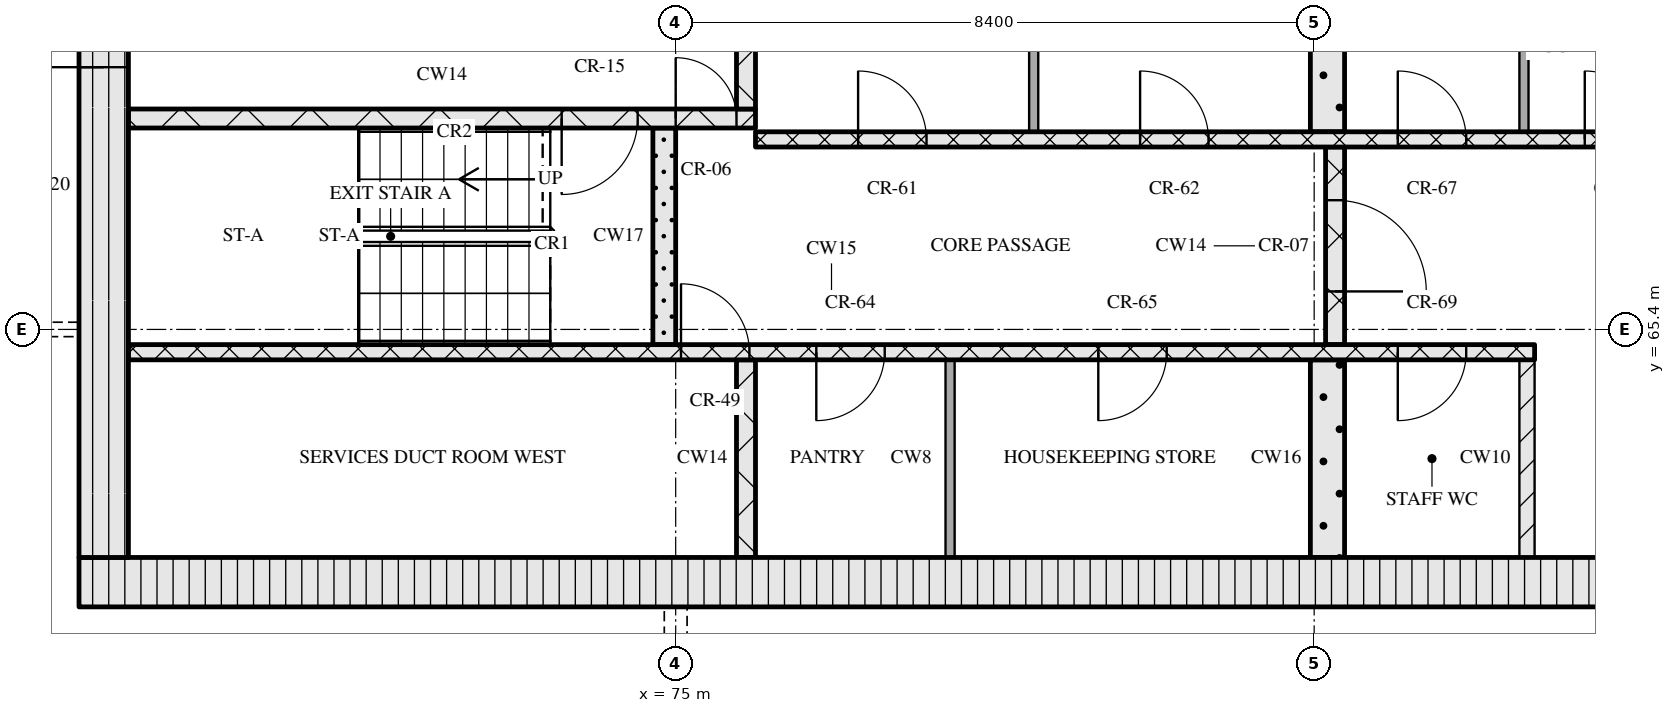
"""IFC4 building model, lengths in metres.
Left out: names, types, materials, properties, quantities, classifications, styles, units other than length and angle.
Written with IfcOpenShell. Run it as: python <this file> out.ifc"""

import sys

from ifc_helpers import new_model, si_unit, direction, frame, frame_2d, origin, place, context, subcontext, project, spatial, rectangle, extrude, element, fill, save


model = new_model("IFC4")
c1 = context("Model", 3, precision=1e-05, world=origin(), true_north=direction((0.0, 1.0)))
c2 = subcontext(c1, "Body", "Model", "MODEL_VIEW")
j1 = project(units=[si_unit("LENGTHUNIT", "METRE"), si_unit("PLANEANGLEUNIT", "RADIAN")], contexts=[c1])
p1 = place(None, origin())
s1 = spatial("IfcSite", under=j1, at=p1, CompositionType="ELEMENT")
p2 = place(p1, origin())
s2 = spatial("IfcBuilding", under=s1, at=p2, CompositionType="ELEMENT")
p3 = place(p2, frame((0.0, 0.0, 230.7)))
s3 = spatial("IfcBuildingStorey", under=s2, at=p3, CompositionType="ELEMENT", Elevation=230.7)
p4 = place(p3, frame((67.15, 62.075, 0.0), z_axis=(0.0, 0.0, 1.0), x_axis=(1.0, 0.0, 0.0)))
e1 = element("IfcWall", 1, at=p4, inside=s3, PredefinedType="SOLIDWALL", context=c2, shape_type="SweptSolid", body=[
    extrude(rectangle(XDim=40.9, YDim=0.65, at=frame_2d((20.45, 0.0))), origin(), (0.0, 0.0, 1.0), 3.32),
])
p5 = place(p4, frame((20.8, 0.0, 0.0)))
e2 = element("IfcOpeningElement", 2, at=p5, cuts=e1, PredefinedType="OPENING", context=c2, shape_type="SweptSolid", body=[
    extrude(rectangle(XDim=1.8, YDim=2.1, at=frame_2d((0.9, 1.05))), frame((0.0, 0.335, 0.0), z_axis=(0.0, -1.0, 0.0), x_axis=(1.0, 0.0, 0.0)), (0.0, 0.0, 1.0), 0.67),
])
p6 = place(p3, frame((67.475, 62.4, 0.0), z_axis=(0.0, 0.0, 1.0), x_axis=(0.0, 1.0, 0.0)))
e3 = element("IfcWall", 3, at=p6, inside=s3, PredefinedType="SOLIDWALL", context=c2, shape_type="SweptSolid", body=[
    extrude(rectangle(XDim=12.0, YDim=0.65, at=frame_2d((6.0, 0.0))), origin(), (0.0, 0.0, 1.0), 3.32),
])
p7 = place(p6, frame((6.45, 0.0, 0.0)))
e4 = element("IfcOpeningElement", 4, at=p7, cuts=e3, PredefinedType="OPENING", context=c2, shape_type="SweptSolid", body=[
    extrude(rectangle(XDim=1.2, YDim=2.1, at=frame_2d((0.6, 1.05))), frame((0.0, 0.335, 0.0), z_axis=(0.0, -1.0, 0.0), x_axis=(1.0, 0.0, 0.0)), (0.0, 0.0, 1.0), 0.67),
])
p8 = place(p3, frame((75.925, 62.4, 0.0), z_axis=(0.0, 0.0, 1.0), x_axis=(0.0, 1.0, 0.0)))
e5 = element("IfcWall", 5, at=p8, inside=s3, PredefinedType="SOLIDWALL", context=c2, shape_type="SweptSolid", body=[
    extrude(rectangle(XDim=2.6, YDim=0.25, at=frame_2d((1.3, 0.0))), origin(), (0.0, 0.0, 1.0), 3.32),
])
p9 = place(p3, frame((78.61, 62.4, 0.0), z_axis=(0.0, 0.0, 1.0), x_axis=(0.0, 1.0, 0.0)))
e6 = element("IfcWall", 6, at=p9, inside=s3, PredefinedType="PARTITIONING", context=c2, shape_type="SweptSolid", body=[
    extrude(rectangle(XDim=2.6, YDim=0.12, at=frame_2d((1.3, 0.0))), origin(), (0.0, 0.0, 1.0), 3.32),
])
p10 = place(p3, frame((83.575, 62.4, 0.0), z_axis=(0.0, 0.0, 1.0), x_axis=(0.0, 1.0, 0.0)))
e7 = element("IfcWall", 7, at=p10, inside=s3, PredefinedType="SOLIDWALL", context=c2, shape_type="SweptSolid", body=[
    extrude(rectangle(XDim=2.6, YDim=0.45, at=frame_2d((1.3, 0.0))), origin(), (0.0, 0.0, 1.0), 3.32),
])
p11 = place(p3, frame((86.2, 62.4, 0.0), z_axis=(0.0, 0.0, 1.0), x_axis=(0.0, 1.0, 0.0)))
e8 = element("IfcWall", 8, at=p11, inside=s3, PredefinedType="PARTITIONING", context=c2, shape_type="SweptSolid", body=[
    extrude(rectangle(XDim=2.6, YDim=0.2, at=frame_2d((1.3, 0.0))), origin(), (0.0, 0.0, 1.0), 3.32),
])
p12 = place(p3, frame((67.8, 65.1, 0.0), z_axis=(0.0, 0.0, 1.0), x_axis=(1.0, 0.0, 0.0)))
e9 = element("IfcWall", 9, at=p12, inside=s3, PredefinedType="SOLIDWALL", context=c2, shape_type="SweptSolid", body=[
    extrude(rectangle(XDim=18.5, YDim=0.2, at=frame_2d((9.25, 0.0))), origin(), (0.0, 0.0, 1.0), 3.32),
])
p13 = place(p12, frame((7.27, 0.0, 0.0)))
e10 = element("IfcOpeningElement", 10, at=p13, cuts=e9, PredefinedType="OPENING", context=c2, shape_type="SweptSolid", body=[
    extrude(rectangle(XDim=0.9, YDim=2.1, at=frame_2d((0.45, 1.05))), frame((0.0, 0.11, 0.0), z_axis=(0.0, -1.0, 0.0), x_axis=(1.0, 0.0, 0.0)), (0.0, 0.0, 1.0), 0.22),
])
p14 = place(p12, frame((9.05, 0.0, 0.0)))
e11 = element("IfcOpeningElement", 11, at=p14, cuts=e9, PredefinedType="OPENING", context=c2, shape_type="SweptSolid", body=[
    extrude(rectangle(XDim=0.9, YDim=2.1, at=frame_2d((0.45, 1.05))), frame((0.0, 0.11, 0.0), z_axis=(0.0, -1.0, 0.0), x_axis=(1.0, 0.0, 0.0)), (0.0, 0.0, 1.0), 0.22),
])
p15 = place(p12, frame((12.76, 0.0, 0.0)))
e12 = element("IfcOpeningElement", 12, at=p15, cuts=e9, PredefinedType="OPENING", context=c2, shape_type="SweptSolid", body=[
    extrude(rectangle(XDim=0.9, YDim=2.1, at=frame_2d((0.45, 1.05))), frame((0.0, 0.11, 0.0), z_axis=(0.0, -1.0, 0.0), x_axis=(1.0, 0.0, 0.0)), (0.0, 0.0, 1.0), 0.22),
])
p16 = place(p12, frame((16.7, 0.0, 0.0)))
e13 = element("IfcOpeningElement", 13, at=p16, cuts=e9, PredefinedType="OPENING", context=c2, shape_type="SweptSolid", body=[
    extrude(rectangle(XDim=0.9, YDim=2.1, at=frame_2d((0.45, 1.05))), frame((0.0, 0.11, 0.0), z_axis=(0.0, -1.0, 0.0), x_axis=(1.0, 0.0, 0.0)), (0.0, 0.0, 1.0), 0.22),
])
p17 = place(p3, frame((74.85, 65.2, 0.0), z_axis=(0.0, 0.0, 1.0), x_axis=(0.0, 1.0, 0.0)))
e14 = element("IfcWall", 14, at=p17, inside=s3, PredefinedType="SOLIDWALL", context=c2, shape_type="SweptSolid", body=[
    extrude(rectangle(XDim=2.85, YDim=0.3, at=frame_2d((1.425, 0.0))), origin(), (0.0, 0.0, 1.0), 3.32),
])
p18 = place(p3, frame((83.675, 65.2, 0.0), z_axis=(0.0, 0.0, 1.0), x_axis=(0.0, 1.0, 0.0)))
e15 = element("IfcWall", 15, at=p18, inside=s3, PredefinedType="SOLIDWALL", context=c2, shape_type="SweptSolid", body=[
    extrude(rectangle(XDim=2.6, YDim=0.25, at=frame_2d((1.3, 0.0))), origin(), (0.0, 0.0, 1.0), 3.32),
])
p19 = place(p18, frame((0.7, 0.0, 0.0)))
e16 = element("IfcOpeningElement", 16, at=p19, cuts=e15, PredefinedType="OPENING", context=c2, shape_type="SweptSolid", body=[
    extrude(rectangle(XDim=1.2, YDim=2.1, at=frame_2d((0.6, 1.05))), frame((0.0, 0.135, 0.0), z_axis=(0.0, -1.0, 0.0), x_axis=(1.0, 0.0, 0.0)), (0.0, 0.0, 1.0), 0.27),
])
p20 = place(p3, frame((76.05, 67.9, 0.0), z_axis=(0.0, 0.0, 1.0), x_axis=(1.0, 0.0, 0.0)))
e17 = element("IfcWall", 17, at=p20, inside=s3, PredefinedType="SOLIDWALL", context=c2, shape_type="SweptSolid", body=[
    extrude(rectangle(XDim=23.1, YDim=0.2, at=frame_2d((11.55, 0.0))), origin(), (0.0, 0.0, 1.0), 3.32),
])
p21 = place(p20, frame((1.35, 0.0, 0.0)))
e18 = element("IfcOpeningElement", 18, at=p21, cuts=e17, PredefinedType="OPENING", context=c2, shape_type="SweptSolid", body=[
    extrude(rectangle(XDim=0.9, YDim=2.1, at=frame_2d((0.45, 1.05))), frame((0.0, 0.11, 0.0), z_axis=(0.0, -1.0, 0.0), x_axis=(1.0, 0.0, 0.0)), (0.0, 0.0, 1.0), 0.22),
])
p22 = place(p20, frame((5.06, 0.0, 0.0)))
e19 = element("IfcOpeningElement", 19, at=p22, cuts=e17, PredefinedType="OPENING", context=c2, shape_type="SweptSolid", body=[
    extrude(rectangle(XDim=0.9, YDim=2.1, at=frame_2d((0.45, 1.05))), frame((0.0, 0.11, 0.0), z_axis=(0.0, -1.0, 0.0), x_axis=(1.0, 0.0, 0.0)), (0.0, 0.0, 1.0), 0.22),
])
p23 = place(p20, frame((8.45, 0.0, 0.0)))
e20 = element("IfcOpeningElement", 20, at=p23, cuts=e17, PredefinedType="OPENING", context=c2, shape_type="SweptSolid", body=[
    extrude(rectangle(XDim=0.9, YDim=2.1, at=frame_2d((0.45, 1.05))), frame((0.0, 0.11, 0.0), z_axis=(0.0, -1.0, 0.0), x_axis=(1.0, 0.0, 0.0)), (0.0, 0.0, 1.0), 0.22),
])
p24 = place(p20, frame((10.91, 0.0, 0.0)))
e21 = element("IfcOpeningElement", 21, at=p24, cuts=e17, PredefinedType="OPENING", context=c2, shape_type="SweptSolid", body=[
    extrude(rectangle(XDim=0.9, YDim=2.1, at=frame_2d((0.45, 1.05))), frame((0.0, 0.11, 0.0), z_axis=(0.0, -1.0, 0.0), x_axis=(1.0, 0.0, 0.0)), (0.0, 0.0, 1.0), 0.22),
])
p25 = place(p20, frame((13.55, 0.0, 0.0)))
e22 = element("IfcOpeningElement", 22, at=p25, cuts=e17, PredefinedType="OPENING", context=c2, shape_type="SweptSolid", body=[
    extrude(rectangle(XDim=1.0, YDim=2.1, at=frame_2d((0.5, 1.05))), frame((0.0, 0.11, 0.0), z_axis=(0.0, -1.0, 0.0), x_axis=(1.0, 0.0, 0.0)), (0.0, 0.0, 1.0), 0.22),
])
p26 = place(p20, frame((16.2, 0.0, 0.0)))
e23 = element("IfcOpeningElement", 23, at=p26, cuts=e17, PredefinedType="OPENING", context=c2, shape_type="SweptSolid", body=[
    extrude(rectangle(XDim=1.1, YDim=2.1, at=frame_2d((0.55, 1.05))), frame((0.0, 0.11, 0.0), z_axis=(0.0, -1.0, 0.0), x_axis=(1.0, 0.0, 0.0)), (0.0, 0.0, 1.0), 0.22),
])
p27 = place(p20, frame((18.7, 0.0, 0.0)))
e24 = element("IfcOpeningElement", 24, at=p27, cuts=e17, PredefinedType="OPENING", context=c2, shape_type="SweptSolid", body=[
    extrude(rectangle(XDim=1.1, YDim=2.1, at=frame_2d((0.55, 1.05))), frame((0.0, 0.11, 0.0), z_axis=(0.0, -1.0, 0.0), x_axis=(1.0, 0.0, 0.0)), (0.0, 0.0, 1.0), 0.22),
])
p28 = place(p20, frame((21.2, 0.0, 0.0)))
e25 = element("IfcOpeningElement", 25, at=p28, cuts=e17, PredefinedType="OPENING", context=c2, shape_type="SweptSolid", body=[
    extrude(rectangle(XDim=1.1, YDim=2.1, at=frame_2d((0.55, 1.05))), frame((0.0, 0.11, 0.0), z_axis=(0.0, -1.0, 0.0), x_axis=(1.0, 0.0, 0.0)), (0.0, 0.0, 1.0), 0.22),
])
p29 = place(p3, frame((79.71, 68.0, 0.0), z_axis=(0.0, 0.0, 1.0), x_axis=(0.0, 1.0, 0.0)))
e26 = element("IfcWall", 26, at=p29, inside=s3, PredefinedType="PARTITIONING", context=c2, shape_type="SweptSolid", body=[
    extrude(rectangle(XDim=2.6, YDim=0.12, at=frame_2d((1.3, 0.0))), origin(), (0.0, 0.0, 1.0), 3.32),
])
p30 = place(p3, frame((83.575, 68.0, 0.0), z_axis=(0.0, 0.0, 1.0), x_axis=(0.0, 1.0, 0.0)))
e27 = element("IfcWall", 27, at=p30, inside=s3, PredefinedType="SOLIDWALL", context=c2, shape_type="SweptSolid", body=[
    extrude(rectangle(XDim=2.6, YDim=0.45, at=frame_2d((1.3, 0.0))), origin(), (0.0, 0.0, 1.0), 3.32),
])
p31 = place(p3, frame((86.16, 68.0, 0.0), z_axis=(0.0, 0.0, 1.0), x_axis=(0.0, 1.0, 0.0)))
e28 = element("IfcWall", 28, at=p31, inside=s3, PredefinedType="PARTITIONING", context=c2, shape_type="SweptSolid", body=[
    extrude(rectangle(XDim=2.6, YDim=0.12, at=frame_2d((1.3, 0.0))), origin(), (0.0, 0.0, 1.0), 3.32),
])
p32 = place(p3, frame((67.8, 68.175, 0.0), z_axis=(0.0, 0.0, 1.0), x_axis=(1.0, 0.0, 0.0)))
e29 = element("IfcWall", 29, at=p32, inside=s3, PredefinedType="SOLIDWALL", context=c2, shape_type="SweptSolid", body=[
    extrude(rectangle(XDim=8.25, YDim=0.25, at=frame_2d((4.125, 0.0))), origin(), (0.0, 0.0, 1.0), 3.32),
])
p33 = place(p32, frame((5.7, 0.0, 0.0)))
e30 = element("IfcOpeningElement", 30, at=p33, cuts=e29, PredefinedType="OPENING", context=c2, shape_type="SweptSolid", body=[
    extrude(rectangle(XDim=1.0, YDim=2.1, at=frame_2d((0.5, 1.05))), frame((0.0, 0.135, 0.0), z_axis=(0.0, -1.0, 0.0), x_axis=(1.0, 0.0, 0.0)), (0.0, 0.0, 1.0), 0.27),
])
p34 = place(p32, frame((7.2, 0.0, 0.0)))
e31 = element("IfcOpeningElement", 31, at=p34, cuts=e29, PredefinedType="OPENING", context=c2, shape_type="SweptSolid", body=[
    extrude(rectangle(XDim=0.8, YDim=2.1, at=frame_2d((0.4, 1.05))), frame((0.0, 0.135, 0.0), z_axis=(0.0, -1.0, 0.0), x_axis=(1.0, 0.0, 0.0)), (0.0, 0.0, 1.0), 0.27),
])
p35 = place(p3, frame((75.925, 68.3, 0.0), z_axis=(0.0, 0.0, 1.0), x_axis=(0.0, 1.0, 0.0)))
e32 = element("IfcWall", 32, at=p35, inside=s3, PredefinedType="SOLIDWALL", context=c2, shape_type="SweptSolid", body=[
    extrude(rectangle(XDim=2.3, YDim=0.25, at=frame_2d((1.15, 0.0))), origin(), (0.0, 0.0, 1.0), 3.32),
])
p36 = place(p13, origin())
e33 = element("IfcDoor", 33, at=p36, inside=s3, OperationType="SINGLE_SWING_LEFT", PredefinedType="DOOR", context=c2, shape_type="SweptSolid", body=[
    extrude(rectangle(XDim=0.9, YDim=2.1, at=frame_2d((0.45, 1.05))), frame((0.0, 0.025, 0.0), z_axis=(0.0, -1.0, 0.0), x_axis=(1.0, 0.0, 0.0)), (0.0, 0.0, 1.0), 0.05),
])
fill(e10, e33)
p37 = place(p14, origin())
e34 = element("IfcDoor", 34, at=p37, inside=s3, OperationType="SINGLE_SWING_RIGHT", PredefinedType="DOOR", context=c2, shape_type="SweptSolid", body=[
    extrude(rectangle(XDim=0.9, YDim=2.1, at=frame_2d((0.45, 1.05))), frame((0.0, 0.025, 0.0), z_axis=(0.0, -1.0, 0.0), x_axis=(1.0, 0.0, 0.0)), (0.0, 0.0, 1.0), 0.05),
])
fill(e11, e34)
p38 = place(p15, origin())
e35 = element("IfcDoor", 35, at=p38, inside=s3, OperationType="SINGLE_SWING_RIGHT", PredefinedType="DOOR", context=c2, shape_type="SweptSolid", body=[
    extrude(rectangle(XDim=0.9, YDim=2.1, at=frame_2d((0.45, 1.05))), frame((0.0, 0.025, 0.0), z_axis=(0.0, -1.0, 0.0), x_axis=(1.0, 0.0, 0.0)), (0.0, 0.0, 1.0), 0.05),
])
fill(e12, e35)
p39 = place(p16, origin())
e36 = element("IfcDoor", 36, at=p39, inside=s3, OperationType="SINGLE_SWING_RIGHT", PredefinedType="DOOR", context=c2, shape_type="SweptSolid", body=[
    extrude(rectangle(XDim=0.9, YDim=2.1, at=frame_2d((0.45, 1.05))), frame((0.0, 0.025, 0.0), z_axis=(0.0, -1.0, 0.0), x_axis=(1.0, 0.0, 0.0)), (0.0, 0.0, 1.0), 0.05),
])
fill(e13, e36)
p40 = place(p19, origin())
e37 = element("IfcDoor", 37, at=p40, inside=s3, OperationType="SINGLE_SWING_RIGHT", PredefinedType="DOOR", context=c2, shape_type="SweptSolid", body=[
    extrude(rectangle(XDim=1.2, YDim=2.1, at=frame_2d((0.6, 1.05))), frame((0.0, 0.025, 0.0), z_axis=(0.0, -1.0, 0.0), x_axis=(1.0, 0.0, 0.0)), (0.0, 0.0, 1.0), 0.05),
])
fill(e16, e37)
p41 = place(p21, origin())
e38 = element("IfcDoor", 38, at=p41, inside=s3, OperationType="SINGLE_SWING_LEFT", PredefinedType="DOOR", context=c2, shape_type="SweptSolid", body=[
    extrude(rectangle(XDim=0.9, YDim=2.1, at=frame_2d((0.45, 1.05))), frame((0.0, 0.025, 0.0), z_axis=(0.0, -1.0, 0.0), x_axis=(1.0, 0.0, 0.0)), (0.0, 0.0, 1.0), 0.05),
])
fill(e18, e38)
p42 = place(p22, origin())
e39 = element("IfcDoor", 39, at=p42, inside=s3, OperationType="SINGLE_SWING_LEFT", PredefinedType="DOOR", context=c2, shape_type="SweptSolid", body=[
    extrude(rectangle(XDim=0.9, YDim=2.1, at=frame_2d((0.45, 1.05))), frame((0.0, 0.025, 0.0), z_axis=(0.0, -1.0, 0.0), x_axis=(1.0, 0.0, 0.0)), (0.0, 0.0, 1.0), 0.05),
])
fill(e19, e39)
p43 = place(p23, origin())
e40 = element("IfcDoor", 40, at=p43, inside=s3, OperationType="SINGLE_SWING_LEFT", PredefinedType="DOOR", context=c2, shape_type="SweptSolid", body=[
    extrude(rectangle(XDim=0.9, YDim=2.1, at=frame_2d((0.45, 1.05))), frame((0.0, 0.025, 0.0), z_axis=(0.0, -1.0, 0.0), x_axis=(1.0, 0.0, 0.0)), (0.0, 0.0, 1.0), 0.05),
])
fill(e20, e40)
p44 = place(p24, origin())
e41 = element("IfcDoor", 41, at=p44, inside=s3, OperationType="SINGLE_SWING_LEFT", PredefinedType="DOOR", context=c2, shape_type="SweptSolid", body=[
    extrude(rectangle(XDim=0.9, YDim=2.1, at=frame_2d((0.45, 1.05))), frame((0.0, 0.025, 0.0), z_axis=(0.0, -1.0, 0.0), x_axis=(1.0, 0.0, 0.0)), (0.0, 0.0, 1.0), 0.05),
])
fill(e21, e41)
p45 = place(p33, origin())
e42 = element("IfcDoor", 42, at=p45, inside=s3, OperationType="SINGLE_SWING_RIGHT", PredefinedType="DOOR", context=c2, shape_type="SweptSolid", body=[
    extrude(rectangle(XDim=1.0, YDim=2.1, at=frame_2d((0.5, 1.05))), frame((0.0, 0.025, 0.0), z_axis=(0.0, -1.0, 0.0), x_axis=(1.0, 0.0, 0.0)), (0.0, 0.0, 1.0), 0.05),
])
fill(e30, e42)
p46 = place(p34, origin())
e43 = element("IfcDoor", 43, at=p46, inside=s3, OperationType="SINGLE_SWING_LEFT", PredefinedType="DOOR", context=c2, shape_type="SweptSolid", body=[
    extrude(rectangle(XDim=0.8, YDim=2.1, at=frame_2d((0.4, 1.05))), frame((0.0, 0.025, 0.0), z_axis=(0.0, -1.0, 0.0), x_axis=(1.0, 0.0, 0.0)), (0.0, 0.0, 1.0), 0.05),
])
fill(e31, e43)
p47 = place(p7, origin())
e44 = element("IfcDoor", 44, at=p47, inside=s3, OperationType="SINGLE_SWING_LEFT", PredefinedType="DOOR", context=c2, shape_type="SweptSolid", body=[
    extrude(rectangle(XDim=1.2, YDim=2.1, at=frame_2d((0.6, 1.05))), frame((0.0, 0.025, 0.0), z_axis=(0.0, -1.0, 0.0), x_axis=(1.0, 0.0, 0.0)), (0.0, 0.0, 1.0), 0.05),
])
fill(e4, e44)
save(model, sys.argv[1])
